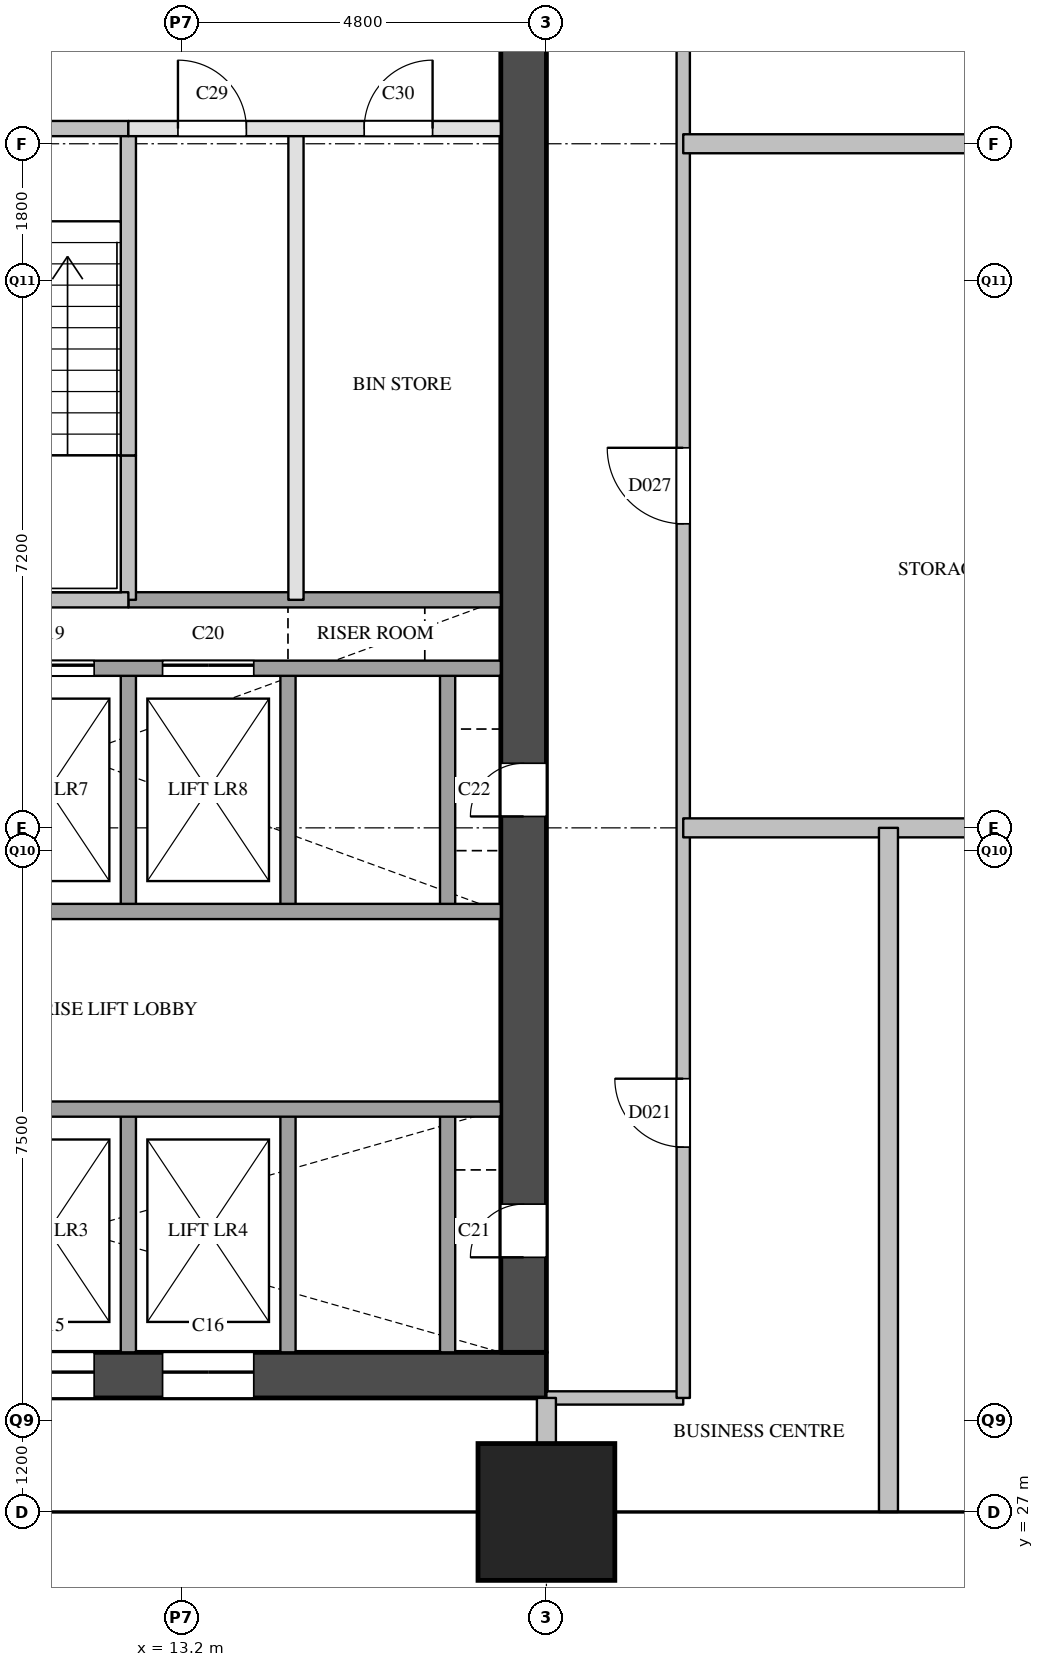
"""IFC4 building model, lengths in metres.
Left out: names, types, materials, properties, quantities, classifications, styles, units other than length and angle.
Written with IfcOpenShell. Run it as: python <this file> out.ifc"""

import sys

from ifc_helpers import new_model, si_unit, direction, frame, frame_2d, origin, origin_2d, place, context, subcontext, project, spatial, rectangle, extrude, element, fill, save


model = new_model("IFC4")
c1 = context("Model", 3, precision=1e-05, world=origin(), true_north=direction((0.0, 1.0)))
c2 = subcontext(c1, "Body", "Model", "MODEL_VIEW")
j1 = project(units=[si_unit("LENGTHUNIT", "METRE"), si_unit("PLANEANGLEUNIT", "RADIAN")], contexts=[c1])
p1 = place(None, origin())
s1 = spatial("IfcSite", under=j1, at=p1, CompositionType="ELEMENT")
p2 = place(p1, origin())
s2 = spatial("IfcBuilding", under=s1, at=p2, CompositionType="ELEMENT")
p3 = place(p2, frame((0.0, 0.0, 96.8)))
s3 = spatial("IfcBuildingStorey", under=s2, at=p3, CompositionType="ELEMENT", Elevation=96.8)
p4 = place(p3, frame((18.0, 27.0, 0.0), z_axis=(0.0, 0.0, 1.0), x_axis=(1.0, 0.0, 0.0)))
e1 = element("IfcColumn", 1, at=p4, inside=s3, PredefinedType="COLUMN", context=c2, shape_type="SweptSolid", body=[
    extrude(rectangle(XDim=1.8, YDim=1.8, at=origin_2d()), origin(), (0.0, 0.0, 1.0), 3.8),
])
p5 = place(p3, frame((5.6, 28.8, 0.0), z_axis=(0.0, 0.0, 1.0), x_axis=(1.0, 0.0, 0.0)))
e2 = element("IfcWall", 2, at=p5, inside=s3, PredefinedType="SHEAR", context=c2, shape_type="SweptSolid", body=[
    extrude(rectangle(XDim=12.4, YDim=0.6, at=frame_2d((6.2, 0.0))), origin(), (0.0, 0.0, 1.0), 3.5),
])
p6 = place(p5, frame((1.05, 0.0, 0.0)))
e3 = element("IfcOpeningElement", 3, at=p6, cuts=e2, PredefinedType="OPENING", context=c2, shape_type="SweptSolid", body=[
    extrude(rectangle(XDim=1.2, YDim=2.1, at=frame_2d((0.6, 1.05))), frame((0.0, 0.31, 0.0), z_axis=(0.0, -1.0, 0.0), x_axis=(1.0, 0.0, 0.0)), (0.0, 0.0, 1.0), 0.62),
])
p7 = place(p5, frame((5.25, 0.0, 0.0)))
e4 = element("IfcOpeningElement", 4, at=p7, cuts=e2, PredefinedType="OPENING", context=c2, shape_type="SweptSolid", body=[
    extrude(rectangle(XDim=1.2, YDim=2.1, at=frame_2d((0.6, 1.05))), frame((0.0, 0.31, 0.0), z_axis=(0.0, -1.0, 0.0), x_axis=(1.0, 0.0, 0.0)), (0.0, 0.0, 1.0), 0.62),
])
p8 = place(p5, frame((7.35, 0.0, 0.0)))
e5 = element("IfcOpeningElement", 5, at=p8, cuts=e2, PredefinedType="OPENING", context=c2, shape_type="SweptSolid", body=[
    extrude(rectangle(XDim=1.2, YDim=2.1, at=frame_2d((0.6, 1.05))), frame((0.0, 0.31, 0.0), z_axis=(0.0, -1.0, 0.0), x_axis=(1.0, 0.0, 0.0)), (0.0, 0.0, 1.0), 0.62),
])
p9 = place(p3, frame((17.7, 29.1, 0.0), z_axis=(0.0, 0.0, 1.0), x_axis=(0.0, 1.0, 0.0)))
e6 = element("IfcWall", 6, at=p9, inside=s3, PredefinedType="SHEAR", context=c2, shape_type="SweptSolid", body=[
    extrude(rectangle(XDim=20.3, YDim=0.6, at=frame_2d((10.15, 0.0))), origin(), (0.0, 0.0, 1.0), 3.5),
])
p10 = place(p9, frame((1.25, 0.0, 0.0)))
e7 = element("IfcOpeningElement", 7, at=p10, cuts=e6, PredefinedType="OPENING", context=c2, shape_type="SweptSolid", body=[
    extrude(rectangle(XDim=0.7, YDim=2.1, at=frame_2d((0.35, 1.05))), frame((0.0, 0.31, 0.0), z_axis=(0.0, -1.0, 0.0), x_axis=(1.0, 0.0, 0.0)), (0.0, 0.0, 1.0), 0.62),
])
p11 = place(p9, frame((7.05, 0.0, 0.0)))
e8 = element("IfcOpeningElement", 8, at=p11, cuts=e6, PredefinedType="OPENING", context=c2, shape_type="SweptSolid", body=[
    extrude(rectangle(XDim=0.7, YDim=2.1, at=frame_2d((0.35, 1.05))), frame((0.0, 0.31, 0.0), z_axis=(0.0, -1.0, 0.0), x_axis=(1.0, 0.0, 0.0)), (0.0, 0.0, 1.0), 0.62),
])
p12 = place(p3, frame((12.5, 29.1, 0.0), z_axis=(0.0, 0.0, 1.0), x_axis=(0.0, 1.0, 0.0)))
e9 = element("IfcWall", 9, at=p12, inside=s3, PredefinedType="SOLIDWALL", context=c2, shape_type="SweptSolid", body=[
    extrude(rectangle(XDim=3.2, YDim=0.2, at=frame_2d((1.6, 0.0))), origin(), (0.0, 0.0, 1.0), 3.5),
])
p13 = place(p3, frame((12.5, 34.9, 0.0), z_axis=(0.0, 0.0, 1.0), x_axis=(0.0, 1.0, 0.0)))
e10 = element("IfcWall", 10, at=p13, inside=s3, PredefinedType="SOLIDWALL", context=c2, shape_type="SweptSolid", body=[
    extrude(rectangle(XDim=3.2, YDim=0.2, at=frame_2d((1.6, 0.0))), origin(), (0.0, 0.0, 1.0), 3.5),
])
p14 = place(p3, frame((12.5, 39.0, 0.0), z_axis=(0.0, 0.0, 1.0), x_axis=(0.0, 1.0, 0.0)))
e11 = element("IfcWall", 11, at=p14, inside=s3, PredefinedType="SOLIDWALL", context=c2, shape_type="SweptSolid", body=[
    extrude(rectangle(XDim=1.9, YDim=0.2, at=frame_2d((0.95, 0.0))), origin(), (0.0, 0.0, 1.0), 3.5),
])
p15 = place(p3, frame((12.5, 40.9, 0.0), z_axis=(0.0, 0.0, 1.0), x_axis=(0.0, 1.0, 0.0)))
e12 = element("IfcWall", 12, at=p15, inside=s3, PredefinedType="SOLIDWALL", context=c2, shape_type="SweptSolid", body=[
    extrude(rectangle(XDim=4.3, YDim=0.2, at=frame_2d((2.15, 0.0))), origin(), (0.0, 0.0, 1.0), 3.5),
])
p16 = place(p3, frame((14.6, 29.1, 0.0), z_axis=(0.0, 0.0, 1.0), x_axis=(0.0, 1.0, 0.0)))
e13 = element("IfcWall", 13, at=p16, inside=s3, PredefinedType="SOLIDWALL", context=c2, shape_type="SweptSolid", body=[
    extrude(rectangle(XDim=3.2, YDim=0.2, at=frame_2d((1.6, 0.0))), origin(), (0.0, 0.0, 1.0), 3.5),
])
p17 = place(p3, frame((14.6, 34.9, 0.0), z_axis=(0.0, 0.0, 1.0), x_axis=(0.0, 1.0, 0.0)))
e14 = element("IfcWall", 14, at=p17, inside=s3, PredefinedType="SOLIDWALL", context=c2, shape_type="SweptSolid", body=[
    extrude(rectangle(XDim=3.2, YDim=0.2, at=frame_2d((1.6, 0.0))), origin(), (0.0, 0.0, 1.0), 3.5),
])
p18 = place(p3, frame((14.705, 39.0, 0.0), z_axis=(0.0, 0.0, 1.0), x_axis=(0.0, 1.0, 0.0)))
e15 = element("IfcWall", 15, at=p18, inside=s3, PredefinedType="PARTITIONING", context=c2, shape_type="SweptSolid", body=[
    extrude(rectangle(XDim=6.2, YDim=0.2, at=frame_2d((3.1, 0.0))), origin(), (0.0, 0.0, 1.0), 3.5),
])
p19 = place(p3, frame((16.7, 29.1, 0.0), z_axis=(0.0, 0.0, 1.0), x_axis=(0.0, 1.0, 0.0)))
e16 = element("IfcWall", 16, at=p19, inside=s3, PredefinedType="SOLIDWALL", context=c2, shape_type="SweptSolid", body=[
    extrude(rectangle(XDim=3.2, YDim=0.2, at=frame_2d((1.6, 0.0))), origin(), (0.0, 0.0, 1.0), 3.5),
])
p20 = place(p3, frame((16.7, 34.9, 0.0), z_axis=(0.0, 0.0, 1.0), x_axis=(0.0, 1.0, 0.0)))
e17 = element("IfcWall", 17, at=p20, inside=s3, PredefinedType="SOLIDWALL", context=c2, shape_type="SweptSolid", body=[
    extrude(rectangle(XDim=3.2, YDim=0.2, at=frame_2d((1.6, 0.0))), origin(), (0.0, 0.0, 1.0), 3.5),
])
p21 = place(p3, frame((6.2, 32.3, 0.0), z_axis=(0.0, 0.0, 1.0), x_axis=(1.0, 0.0, 0.0)))
e18 = element("IfcWall", 18, at=p21, inside=s3, PredefinedType="SOLIDWALL", context=c2, shape_type="SweptSolid", body=[
    extrude(rectangle(XDim=11.2, YDim=0.2, at=frame_2d((5.6, 0.0))), origin(), (0.0, 0.0, 1.0), 3.5),
])
p22 = place(p21, frame((2.55, 0.0, 0.0)))
e19 = element("IfcOpeningElement", 19, at=p22, cuts=e18, PredefinedType="OPENING", context=c2, shape_type="SweptSolid", body=[
    extrude(rectangle(XDim=1.2, YDim=2.1, at=frame_2d((0.6, 1.05))), frame((0.0, 0.11, 0.0), z_axis=(0.0, -1.0, 0.0), x_axis=(1.0, 0.0, 0.0)), (0.0, 0.0, 1.0), 0.22),
])
p23 = place(p3, frame((6.2, 34.9, 0.0), z_axis=(0.0, 0.0, 1.0), x_axis=(1.0, 0.0, 0.0)))
e20 = element("IfcWall", 20, at=p23, inside=s3, PredefinedType="SOLIDWALL", context=c2, shape_type="SweptSolid", body=[
    extrude(rectangle(XDim=11.2, YDim=0.2, at=frame_2d((5.6, 0.0))), origin(), (0.0, 0.0, 1.0), 3.5),
])
p24 = place(p3, frame((6.2, 38.1, 0.0), z_axis=(0.0, 0.0, 1.0), x_axis=(1.0, 0.0, 0.0)))
e21 = element("IfcWall", 21, at=p24, inside=s3, PredefinedType="SOLIDWALL", context=c2, shape_type="SweptSolid", body=[
    extrude(rectangle(XDim=11.2, YDim=0.2, at=frame_2d((5.6, 0.0))), origin(), (0.0, 0.0, 1.0), 3.5),
])
p25 = place(p24, frame((0.45, 0.0, 0.0)))
e22 = element("IfcOpeningElement", 22, at=p25, cuts=e21, PredefinedType="OPENING", context=c2, shape_type="SweptSolid", body=[
    extrude(rectangle(XDim=1.2, YDim=2.1, at=frame_2d((0.6, 1.05))), frame((0.0, 0.11, 0.0), z_axis=(0.0, -1.0, 0.0), x_axis=(1.0, 0.0, 0.0)), (0.0, 0.0, 1.0), 0.22),
])
p26 = place(p24, frame((2.55, 0.0, 0.0)))
e23 = element("IfcOpeningElement", 23, at=p26, cuts=e21, PredefinedType="OPENING", context=c2, shape_type="SweptSolid", body=[
    extrude(rectangle(XDim=1.2, YDim=2.1, at=frame_2d((0.6, 1.05))), frame((0.0, 0.11, 0.0), z_axis=(0.0, -1.0, 0.0), x_axis=(1.0, 0.0, 0.0)), (0.0, 0.0, 1.0), 0.22),
])
p27 = place(p24, frame((4.65, 0.0, 0.0)))
e24 = element("IfcOpeningElement", 24, at=p27, cuts=e21, PredefinedType="OPENING", context=c2, shape_type="SweptSolid", body=[
    extrude(rectangle(XDim=1.2, YDim=2.1, at=frame_2d((0.6, 1.05))), frame((0.0, 0.11, 0.0), z_axis=(0.0, -1.0, 0.0), x_axis=(1.0, 0.0, 0.0)), (0.0, 0.0, 1.0), 0.22),
])
p28 = place(p24, frame((6.75, 0.0, 0.0)))
e25 = element("IfcOpeningElement", 25, at=p28, cuts=e21, PredefinedType="OPENING", context=c2, shape_type="SweptSolid", body=[
    extrude(rectangle(XDim=1.2, YDim=2.1, at=frame_2d((0.6, 1.05))), frame((0.0, 0.11, 0.0), z_axis=(0.0, -1.0, 0.0), x_axis=(1.0, 0.0, 0.0)), (0.0, 0.0, 1.0), 0.22),
])
p29 = place(p3, frame((12.5, 39.0, 0.0), z_axis=(0.0, 0.0, 1.0), x_axis=(1.0, 0.0, 0.0)))
e26 = element("IfcWall", 26, at=p29, inside=s3, PredefinedType="SOLIDWALL", context=c2, shape_type="SweptSolid", body=[
    extrude(rectangle(XDim=4.9, YDim=0.2, at=frame_2d((2.45, 0.0))), origin(), (0.0, 0.0, 1.0), 3.5),
])
p30 = place(p3, frame((9.45, 39.0, 0.0), z_axis=(0.0, 0.0, 1.0), x_axis=(1.0, 0.0, 0.0)))
e27 = element("IfcWall", 27, at=p30, inside=s3, PredefinedType="SOLIDWALL", context=c2, shape_type="SweptSolid", body=[
    extrude(rectangle(XDim=3.05, YDim=0.2, at=frame_2d((1.525, 0.0))), origin(), (0.0, 0.0, 1.0), 3.5),
])
p31 = place(p3, frame((12.5, 45.2, 0.0), z_axis=(0.0, 0.0, 1.0), x_axis=(1.0, 0.0, 0.0)))
e28 = element("IfcWall", 28, at=p31, inside=s3, PredefinedType="PARTITIONING", context=c2, shape_type="SweptSolid", body=[
    extrude(rectangle(XDim=4.9, YDim=0.2, at=frame_2d((2.45, 0.0))), origin(), (0.0, 0.0, 1.0), 3.5),
])
p32 = place(p31, frame((0.653, 0.0, 0.0)))
e29 = element("IfcOpeningElement", 29, at=p32, cuts=e28, PredefinedType="OPENING", context=c2, shape_type="SweptSolid", body=[
    extrude(rectangle(XDim=0.9, YDim=2.1, at=frame_2d((0.45, 1.05))), frame((0.0, 0.11, 0.0), z_axis=(0.0, -1.0, 0.0), x_axis=(1.0, 0.0, 0.0)), (0.0, 0.0, 1.0), 0.22),
])
p33 = place(p31, frame((3.103, 0.0, 0.0)))
e30 = element("IfcOpeningElement", 30, at=p33, cuts=e28, PredefinedType="OPENING", context=c2, shape_type="SweptSolid", body=[
    extrude(rectangle(XDim=0.9, YDim=2.1, at=frame_2d((0.45, 1.05))), frame((0.0, 0.11, 0.0), z_axis=(0.0, -1.0, 0.0), x_axis=(1.0, 0.0, 0.0)), (0.0, 0.0, 1.0), 0.22),
])
p34 = place(p3, frame((6.2, 45.2, 0.0), z_axis=(0.0, 0.0, 1.0), x_axis=(1.0, 0.0, 0.0)))
e31 = element("IfcWall", 31, at=p34, inside=s3, PredefinedType="SOLIDWALL", context=c2, shape_type="SweptSolid", body=[
    extrude(rectangle(XDim=6.3, YDim=0.2, at=frame_2d((3.15, 0.0))), origin(), (0.0, 0.0, 1.0), 3.5),
])
p35 = place(p34, frame((1.025, 0.0, 0.0)))
e32 = element("IfcOpeningElement", 32, at=p35, cuts=e31, PredefinedType="OPENING", context=c2, shape_type="SweptSolid", body=[
    extrude(rectangle(XDim=1.1, YDim=2.1, at=frame_2d((0.55, 1.05))), frame((0.0, 0.11, 0.0), z_axis=(0.0, -1.0, 0.0), x_axis=(1.0, 0.0, 0.0)), (0.0, 0.0, 1.0), 0.22),
])
p36 = place(p34, frame((4.175, 0.0, 0.0)))
e33 = element("IfcOpeningElement", 33, at=p36, cuts=e31, PredefinedType="OPENING", context=c2, shape_type="SweptSolid", body=[
    extrude(rectangle(XDim=1.1, YDim=2.1, at=frame_2d((0.55, 1.05))), frame((0.0, 0.11, 0.0), z_axis=(0.0, -1.0, 0.0), x_axis=(1.0, 0.0, 0.0)), (0.0, 0.0, 1.0), 0.22),
])
p37 = place(p3, frame((18.0, 28.5, 0.0), z_axis=(0.0, 0.0, 1.0), x_axis=(1.0, 0.0, 0.0)))
e34 = element("IfcWall", 34, at=p37, inside=s3, PredefinedType="PARTITIONING", context=c2, shape_type="SweptSolid", body=[
    extrude(rectangle(XDim=1.8, YDim=0.175, at=frame_2d((0.9, 0.0))), origin(), (0.0, 0.0, 1.0), 3.5),
])
p38 = place(p3, frame((19.8, 28.5, 0.0), z_axis=(0.0, 0.0, 1.0), x_axis=(0.0, 1.0, 0.0)))
e35 = element("IfcWall", 35, at=p38, inside=s3, PredefinedType="PARTITIONING", context=c2, shape_type="SweptSolid", body=[
    extrude(rectangle(XDim=23.3, YDim=0.175, at=frame_2d((11.65, 0.0))), origin(), (0.0, 0.0, 1.0), 3.5),
])
p39 = place(p38, frame((3.3, 0.0, 0.0)))
e36 = element("IfcOpeningElement", 36, at=p39, cuts=e35, PredefinedType="OPENING", context=c2, shape_type="SweptSolid", body=[
    extrude(rectangle(XDim=0.9, YDim=2.1, at=frame_2d((0.45, 1.05))), frame((0.0, 0.097, 0.0), z_axis=(0.0, -1.0, 0.0), x_axis=(1.0, 0.0, 0.0)), (0.0, 0.0, 1.0), 0.195),
])
p40 = place(p38, frame((11.5, 0.0, 0.0)))
e37 = element("IfcOpeningElement", 37, at=p40, cuts=e35, PredefinedType="OPENING", context=c2, shape_type="SweptSolid", body=[
    extrude(rectangle(XDim=1.0, YDim=2.1, at=frame_2d((0.5, 1.05))), frame((0.0, 0.097, 0.0), z_axis=(0.0, -1.0, 0.0), x_axis=(1.0, 0.0, 0.0)), (0.0, 0.0, 1.0), 0.195),
])
p41 = place(p38, frame((19.45, 0.0, 0.0)))
e38 = element("IfcOpeningElement", 38, at=p41, cuts=e35, PredefinedType="OPENING", context=c2, shape_type="SweptSolid", body=[
    extrude(rectangle(XDim=0.9, YDim=2.1, at=frame_2d((0.45, 1.05))), frame((0.0, 0.097, 0.0), z_axis=(0.0, -1.0, 0.0), x_axis=(1.0, 0.0, 0.0)), (0.0, 0.0, 1.0), 0.195),
])
for number, where, z_axis, x_axis in (
    (39, (19.8, 36.0, 0.0), (0.0, 0.0, 1.0), (1.0, 0.0, 0.0)),
    (40, (19.8, 45.0, 0.0), (0.0, 0.0, 1.0), (1.0, 0.0, 0.0)),
):
    element("IfcWall", number, at=place(p3, frame(where, z_axis=z_axis, x_axis=x_axis)), inside=s3, PredefinedType="PARTITIONING", context=c2, shape_type="SweptSolid", body=[
        extrude(rectangle(XDim=14.4, YDim=0.25, at=frame_2d((7.2, 0.0))), origin(), (0.0, 0.0, 1.0), 3.5),
    ])
p42 = place(p3, frame((18.0, 27.0, 0.0), z_axis=(0.0, 0.0, 1.0), x_axis=(0.0, 1.0, 0.0)))
e41 = element("IfcWall", 41, at=p42, inside=s3, PredefinedType="PARTITIONING", context=c2, shape_type="SweptSolid", body=[
    extrude(rectangle(XDim=1.5, YDim=0.25, at=frame_2d((0.75, 0.0))), origin(), (0.0, 0.0, 1.0), 3.5),
])
p43 = place(p3, frame((22.5, 27.0, 0.0), z_axis=(0.0, 0.0, 1.0), x_axis=(0.0, 1.0, 0.0)))
e42 = element("IfcWall", 42, at=p43, inside=s3, PredefinedType="PARTITIONING", context=c2, shape_type="SweptSolid", body=[
    extrude(rectangle(XDim=9.0, YDim=0.25, at=frame_2d((4.5, 0.0))), origin(), (0.0, 0.0, 1.0), 2.5),
])
p44 = place(p7, origin())
e43 = element("IfcDoor", 43, at=p44, inside=s3, OperationType="SLIDING_TO_LEFT", PredefinedType="DOOR", context=c2, shape_type="SweptSolid", body=[
    extrude(rectangle(XDim=1.2, YDim=2.1, at=frame_2d((0.6, 1.05))), frame((0.0, 0.025, 0.0), z_axis=(0.0, -1.0, 0.0), x_axis=(1.0, 0.0, 0.0)), (0.0, 0.0, 1.0), 0.05),
])
fill(e4, e43)
p45 = place(p8, origin())
e44 = element("IfcDoor", 44, at=p45, inside=s3, OperationType="SLIDING_TO_LEFT", PredefinedType="DOOR", context=c2, shape_type="SweptSolid", body=[
    extrude(rectangle(XDim=1.2, YDim=2.1, at=frame_2d((0.6, 1.05))), frame((0.0, 0.025, 0.0), z_axis=(0.0, -1.0, 0.0), x_axis=(1.0, 0.0, 0.0)), (0.0, 0.0, 1.0), 0.05),
])
fill(e5, e44)
p46 = place(p27, origin())
e45 = element("IfcDoor", 45, at=p46, inside=s3, OperationType="SLIDING_TO_LEFT", PredefinedType="DOOR", context=c2, shape_type="SweptSolid", body=[
    extrude(rectangle(XDim=1.2, YDim=2.1, at=frame_2d((0.6, 1.05))), frame((0.0, 0.025, 0.0), z_axis=(0.0, -1.0, 0.0), x_axis=(1.0, 0.0, 0.0)), (0.0, 0.0, 1.0), 0.05),
])
fill(e24, e45)
p47 = place(p28, origin())
e46 = element("IfcDoor", 46, at=p47, inside=s3, OperationType="SLIDING_TO_LEFT", PredefinedType="DOOR", context=c2, shape_type="SweptSolid", body=[
    extrude(rectangle(XDim=1.2, YDim=2.1, at=frame_2d((0.6, 1.05))), frame((0.0, 0.025, 0.0), z_axis=(0.0, -1.0, 0.0), x_axis=(1.0, 0.0, 0.0)), (0.0, 0.0, 1.0), 0.05),
])
fill(e25, e46)
p48 = place(p10, origin())
e47 = element("IfcDoor", 47, at=p48, inside=s3, OperationType="SINGLE_SWING_LEFT", PredefinedType="DOOR", context=c2, shape_type="SweptSolid", body=[
    extrude(rectangle(XDim=0.7, YDim=2.1, at=frame_2d((0.35, 1.05))), frame((0.0, 0.025, 0.0), z_axis=(0.0, -1.0, 0.0), x_axis=(1.0, 0.0, 0.0)), (0.0, 0.0, 1.0), 0.05),
])
fill(e7, e47)
p49 = place(p11, origin())
e48 = element("IfcDoor", 48, at=p49, inside=s3, OperationType="SINGLE_SWING_LEFT", PredefinedType="DOOR", context=c2, shape_type="SweptSolid", body=[
    extrude(rectangle(XDim=0.7, YDim=2.1, at=frame_2d((0.35, 1.05))), frame((0.0, 0.025, 0.0), z_axis=(0.0, -1.0, 0.0), x_axis=(1.0, 0.0, 0.0)), (0.0, 0.0, 1.0), 0.05),
])
fill(e8, e48)
p50 = place(p32, origin())
e49 = element("IfcDoor", 49, at=p50, inside=s3, OperationType="SINGLE_SWING_LEFT", PredefinedType="DOOR", context=c2, shape_type="SweptSolid", body=[
    extrude(rectangle(XDim=0.9, YDim=2.1, at=frame_2d((0.45, 1.05))), frame((0.0, 0.025, 0.0), z_axis=(0.0, -1.0, 0.0), x_axis=(1.0, 0.0, 0.0)), (0.0, 0.0, 1.0), 0.05),
])
fill(e29, e49)
p51 = place(p33, origin())
e50 = element("IfcDoor", 50, at=p51, inside=s3, OperationType="SINGLE_SWING_RIGHT", PredefinedType="DOOR", context=c2, shape_type="SweptSolid", body=[
    extrude(rectangle(XDim=0.9, YDim=2.1, at=frame_2d((0.45, 1.05))), frame((0.0, 0.025, 0.0), z_axis=(0.0, -1.0, 0.0), x_axis=(1.0, 0.0, 0.0)), (0.0, 0.0, 1.0), 0.05),
])
fill(e30, e50)
p52 = place(p39, origin())
e51 = element("IfcDoor", 51, at=p52, inside=s3, OperationType="SINGLE_SWING_RIGHT", PredefinedType="DOOR", context=c2, shape_type="SweptSolid", body=[
    extrude(rectangle(XDim=0.9, YDim=2.1, at=frame_2d((0.45, 1.05))), frame((0.0, 0.025, 0.0), z_axis=(0.0, -1.0, 0.0), x_axis=(1.0, 0.0, 0.0)), (0.0, 0.0, 1.0), 0.05),
])
fill(e36, e51)
p53 = place(p40, origin())
e52 = element("IfcDoor", 52, at=p53, inside=s3, OperationType="SINGLE_SWING_RIGHT", PredefinedType="DOOR", context=c2, shape_type="SweptSolid", body=[
    extrude(rectangle(XDim=1.0, YDim=2.1, at=frame_2d((0.5, 1.05))), frame((0.0, 0.025, 0.0), z_axis=(0.0, -1.0, 0.0), x_axis=(1.0, 0.0, 0.0)), (0.0, 0.0, 1.0), 0.05),
])
fill(e37, e52)
save(model, sys.argv[1])
